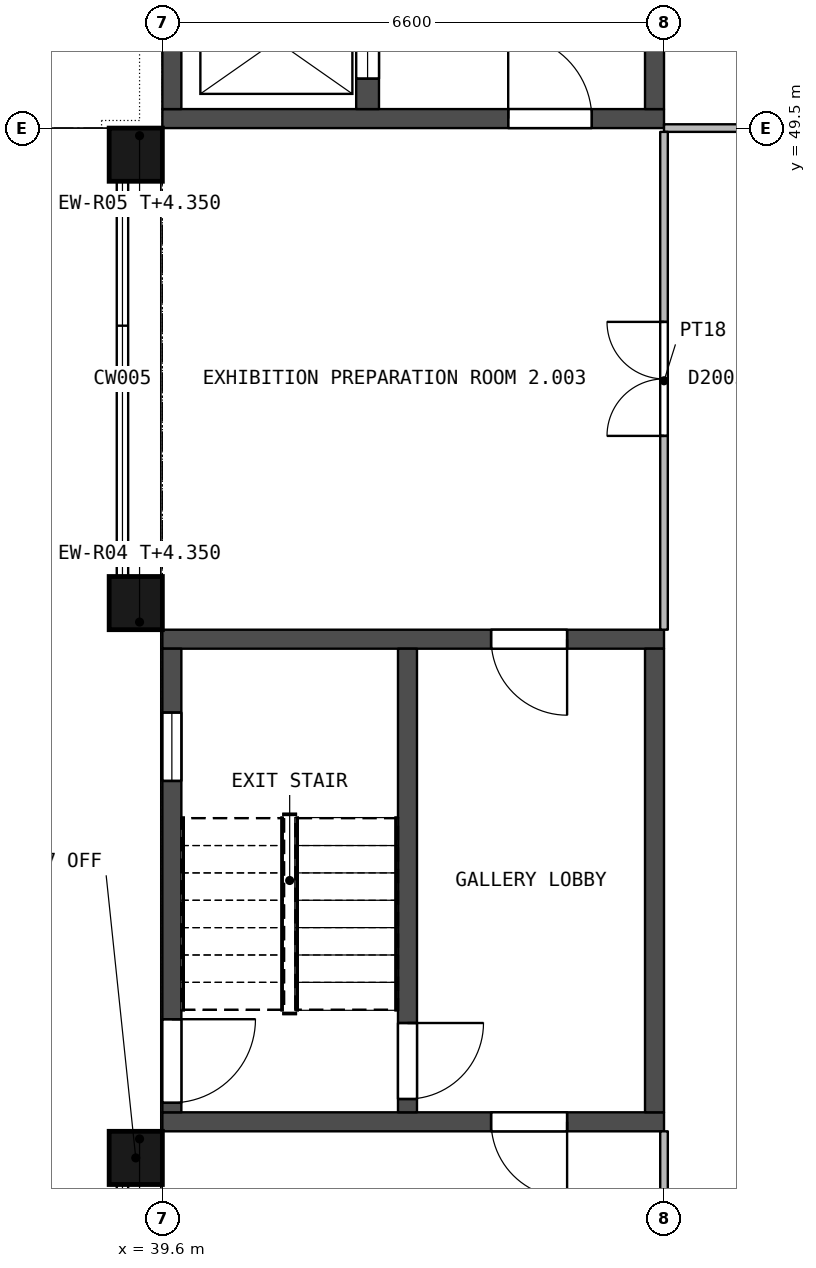
"""IFC4 building model, lengths in metres.
Left out: names, types, materials, properties, quantities, classifications, styles, units other than length and angle.
Written with IfcOpenShell. Run it as: python <this file> out.ifc"""

import sys

from ifc_helpers import new_model, si_unit, direction, frame, frame_2d, origin, origin_2d, place, context, subcontext, project, spatial, rectangle, extrude, element, fill, save


model = new_model("IFC4")
c1 = context("Model", 3, precision=1e-05, world=origin(), true_north=direction((0.0, 1.0)))
c2 = subcontext(c1, "Body", "Model", "MODEL_VIEW")
j1 = project(units=[si_unit("LENGTHUNIT", "METRE"), si_unit("PLANEANGLEUNIT", "RADIAN")], contexts=[c1])
p1 = place(None, origin())
s1 = spatial("IfcSite", under=j1, at=p1, CompositionType="ELEMENT")
p2 = place(p1, origin())
s2 = spatial("IfcBuilding", under=s1, at=p2, CompositionType="ELEMENT")
p3 = place(p2, origin())
s3 = spatial("IfcBuildingStorey", under=s2, at=p3, CompositionType="ELEMENT", Elevation=0.0)
for number, where, z_axis, x_axis in (
    (1, (39.25, 35.95, 0.0), (0.0, 0.0, 1.0), (1.0, 0.0, 0.0)),
    (2, (39.25, 43.25, 0.0), (0.0, 0.0, 1.0), (1.0, 0.0, 0.0)),
    (3, (39.25, 49.15, 0.0), (0.0, 0.0, 1.0), (1.0, 0.0, 0.0)),
):
    element("IfcColumn", number, at=place(p3, frame(where, z_axis=z_axis, x_axis=x_axis)), inside=s3, PredefinedType="COLUMN", context=c2, shape_type="SweptSolid", body=[
        extrude(rectangle(XDim=0.7, YDim=0.7, at=origin_2d()), origin(), (0.0, 0.0, 1.0), 5.4),
    ])
p4 = place(p3, frame((39.6, 49.625, 0.0), z_axis=(0.0, 0.0, 1.0), x_axis=(1.0, 0.0, 0.0)))
e4 = element("IfcWall", 4, at=p4, inside=s3, PredefinedType="SHEAR", context=c2, shape_type="SweptSolid", body=[
    extrude(rectangle(XDim=6.6, YDim=0.25, at=frame_2d((3.3, 0.0))), origin(), (0.0, 0.0, 1.0), 5.15),
])
p5 = place(p4, frame((4.55, 0.0, 0.0)))
e5 = element("IfcOpeningElement", 5, at=p5, cuts=e4, PredefinedType="OPENING", context=c2, shape_type="SweptSolid", body=[
    extrude(rectangle(XDim=1.1, YDim=2.1, at=frame_2d((0.55, 1.05))), frame((0.0, 0.135, 0.0), z_axis=(0.0, -1.0, 0.0), x_axis=(1.0, 0.0, 0.0)), (0.0, 0.0, 1.0), 0.27),
])
p6 = place(p3, frame((46.075, 49.75, 0.0), z_axis=(0.0, 0.0, 1.0), x_axis=(0.0, 1.0, 0.0)))
e6 = element("IfcWall", 6, at=p6, inside=s3, PredefinedType="SHEAR", context=c2, shape_type="SweptSolid", body=[
    extrude(rectangle(XDim=6.1, YDim=0.25, at=frame_2d((3.05, 0.0))), origin(), (0.0, 0.0, 1.0), 5.15),
])
p7 = place(p3, frame((39.725, 49.75, 0.0), z_axis=(0.0, 0.0, 1.0), x_axis=(0.0, 1.0, 0.0)))
e7 = element("IfcWall", 7, at=p7, inside=s3, PredefinedType="SHEAR", context=c2, shape_type="SweptSolid", body=[
    extrude(rectangle(XDim=6.1, YDim=0.25, at=frame_2d((3.05, 0.0))), origin(), (0.0, 0.0, 1.0), 5.15),
])
p8 = place(p7, frame((4.05, 0.0, 2.05)))
e8 = element("IfcOpeningElement", 8, at=p8, cuts=e7, PredefinedType="OPENING", context=c2, shape_type="SweptSolid", body=[
    extrude(rectangle(XDim=0.9, YDim=1.2, at=frame_2d((0.45, 0.6))), frame((0.0, 0.135, 0.0), z_axis=(0.0, -1.0, 0.0), x_axis=(1.0, 0.0, 0.0)), (0.0, 0.0, 1.0), 0.27),
])
p9 = place(p3, frame((42.3, 49.75, 0.0), z_axis=(0.0, 0.0, 1.0), x_axis=(0.0, 1.0, 0.0)))
e9 = element("IfcWall", 9, at=p9, inside=s3, PredefinedType="SHEAR", context=c2, shape_type="SweptSolid", body=[
    extrude(rectangle(XDim=3.05, YDim=0.3, at=frame_2d((1.525, 0.0))), origin(), (0.0, 0.0, 1.0), 5.15),
])
p10 = place(p9, frame((0.4, 0.0, 0.0)))
e10 = element("IfcOpeningElement", 10, at=p10, cuts=e9, PredefinedType="OPENING", context=c2, shape_type="SweptSolid", body=[
    extrude(rectangle(XDim=1.0, YDim=2.1, at=frame_2d((0.5, 1.05))), frame((0.0, 0.16, 0.0), z_axis=(0.0, -1.0, 0.0), x_axis=(1.0, 0.0, 0.0)), (0.0, 0.0, 1.0), 0.32),
])
p11 = place(p3, frame((39.6, 36.425, 0.0), z_axis=(0.0, 0.0, 1.0), x_axis=(1.0, 0.0, 0.0)))
e11 = element("IfcWall", 11, at=p11, inside=s3, PredefinedType="SHEAR", context=c2, shape_type="SweptSolid", body=[
    extrude(rectangle(XDim=6.6, YDim=0.25, at=frame_2d((3.3, 0.0))), origin(), (0.0, 0.0, 1.0), 5.15),
])
p12 = place(p11, frame((4.325, 0.0, 0.0)))
e12 = element("IfcOpeningElement", 12, at=p12, cuts=e11, PredefinedType="OPENING", context=c2, shape_type="SweptSolid", body=[
    extrude(rectangle(XDim=1.0, YDim=2.1, at=frame_2d((0.5, 1.05))), frame((0.0, 0.135, 0.0), z_axis=(0.0, -1.0, 0.0), x_axis=(1.0, 0.0, 0.0)), (0.0, 0.0, 1.0), 0.27),
])
p13 = place(p3, frame((39.6, 42.775, 0.0), z_axis=(0.0, 0.0, 1.0), x_axis=(1.0, 0.0, 0.0)))
e13 = element("IfcWall", 13, at=p13, inside=s3, PredefinedType="SHEAR", context=c2, shape_type="SweptSolid", body=[
    extrude(rectangle(XDim=6.6, YDim=0.25, at=frame_2d((3.3, 0.0))), origin(), (0.0, 0.0, 1.0), 5.15),
])
p14 = place(p13, frame((4.325, 0.0, 0.0)))
e14 = element("IfcOpeningElement", 14, at=p14, cuts=e13, PredefinedType="OPENING", context=c2, shape_type="SweptSolid", body=[
    extrude(rectangle(XDim=1.0, YDim=2.1, at=frame_2d((0.5, 1.05))), frame((0.0, 0.135, 0.0), z_axis=(0.0, -1.0, 0.0), x_axis=(1.0, 0.0, 0.0)), (0.0, 0.0, 1.0), 0.27),
])
p15 = place(p3, frame((39.725, 36.55, 0.0), z_axis=(0.0, 0.0, 1.0), x_axis=(0.0, 1.0, 0.0)))
e15 = element("IfcWall", 15, at=p15, inside=s3, PredefinedType="SHEAR", context=c2, shape_type="SweptSolid", body=[
    extrude(rectangle(XDim=6.1, YDim=0.25, at=frame_2d((3.05, 0.0))), origin(), (0.0, 0.0, 1.0), 5.15),
])
p16 = place(p15, frame((0.125, 0.0, 0.0)))
e16 = element("IfcOpeningElement", 16, at=p16, cuts=e15, PredefinedType="OPENING", context=c2, shape_type="SweptSolid", body=[
    extrude(rectangle(XDim=1.1, YDim=2.4, at=frame_2d((0.55, 1.2))), frame((0.0, 0.135, 0.0), z_axis=(0.0, -1.0, 0.0), x_axis=(1.0, 0.0, 0.0)), (0.0, 0.0, 1.0), 0.27),
])
p17 = place(p15, frame((4.36, 0.0, 2.05)))
e17 = element("IfcOpeningElement", 17, at=p17, cuts=e15, PredefinedType="OPENING", context=c2, shape_type="SweptSolid", body=[
    extrude(rectangle(XDim=0.9, YDim=1.2, at=frame_2d((0.45, 0.6))), frame((0.0, 0.135, 0.0), z_axis=(0.0, -1.0, 0.0), x_axis=(1.0, 0.0, 0.0)), (0.0, 0.0, 1.0), 0.27),
])
p18 = place(p3, frame((46.075, 36.55, 0.0), z_axis=(0.0, 0.0, 1.0), x_axis=(0.0, 1.0, 0.0)))
e18 = element("IfcWall", 18, at=p18, inside=s3, PredefinedType="SHEAR", context=c2, shape_type="SweptSolid", body=[
    extrude(rectangle(XDim=6.1, YDim=0.25, at=frame_2d((3.05, 0.0))), origin(), (0.0, 0.0, 1.0), 5.15),
])
p19 = place(p3, frame((42.825, 36.55, 0.0), z_axis=(0.0, 0.0, 1.0), x_axis=(0.0, 1.0, 0.0)))
e19 = element("IfcWall", 19, at=p19, inside=s3, PredefinedType="SHEAR", context=c2, shape_type="SweptSolid", body=[
    extrude(rectangle(XDim=6.1, YDim=0.25, at=frame_2d((3.05, 0.0))), origin(), (0.0, 0.0, 1.0), 5.15),
])
p20 = place(p19, frame((0.175, 0.0, 0.0)))
e20 = element("IfcOpeningElement", 20, at=p20, cuts=e19, PredefinedType="OPENING", context=c2, shape_type="SweptSolid", body=[
    extrude(rectangle(XDim=1.0, YDim=2.1, at=frame_2d((0.5, 1.05))), frame((0.0, 0.135, 0.0), z_axis=(0.0, -1.0, 0.0), x_axis=(1.0, 0.0, 0.0)), (0.0, 0.0, 1.0), 0.27),
])
for number, where, z_axis, x_axis in (
    (21, (39.6, 36.2, 0.0), (0.0, 0.0, 1.0), (-1.0, 0.0, 0.0)),
    (22, (39.6, 43.0, 0.0), (0.0, 0.0, 1.0), (-1.0, 0.0, 0.0)),
    (23, (39.6, 49.4, 0.0), (0.0, 0.0, 1.0), (-1.0, 0.0, 0.0)),
):
    element("IfcWall", number, at=place(p3, frame(where, z_axis=z_axis, x_axis=x_axis)), inside=s3, PredefinedType="STANDARD", context=c2, shape_type="SweptSolid", body=[
        extrude(rectangle(XDim=0.6, YDim=0.2, at=frame_2d((0.3, 0.0))), origin(), (0.0, 0.0, 1.0), 4.35),
    ])
for number, where, z_axis, x_axis in (
    (24, (46.2, 49.5, 0.0), (0.0, 0.0, 1.0), (1.0, 0.0, 0.0)),
    (25, (46.2, 30.1, 0.0), (0.0, 0.0, 1.0), (0.0, 1.0, 0.0)),
):
    element("IfcWall", number, at=place(p3, frame(where, z_axis=z_axis, x_axis=x_axis)), inside=s3, PredefinedType="PARTITIONING", context=c2, shape_type="SweptSolid", body=[
        extrude(rectangle(XDim=6.2, YDim=0.1, at=frame_2d((3.1, 0.0))), origin(), (0.0, 0.0, 1.0), 4.35),
    ])
p21 = place(p3, frame((46.2, 42.9, 0.0), z_axis=(0.0, 0.0, 1.0), x_axis=(0.0, 1.0, 0.0)))
e26 = element("IfcWall", 26, at=p21, inside=s3, PredefinedType="PARTITIONING", context=c2, shape_type="SweptSolid", body=[
    extrude(rectangle(XDim=6.55, YDim=0.1, at=frame_2d((3.275, 0.0))), origin(), (0.0, 0.0, 1.0), 4.35),
])
p22 = place(p21, frame((2.55, 0.0, 0.0)))
e27 = element("IfcOpeningElement", 27, at=p22, cuts=e26, PredefinedType="OPENING", context=c2, shape_type="SweptSolid", body=[
    extrude(rectangle(XDim=1.5, YDim=2.4, at=frame_2d((0.75, 1.2))), frame((0.0, 0.06, 0.0), z_axis=(0.0, -1.0, 0.0), x_axis=(1.0, 0.0, 0.0)), (0.0, 0.0, 1.0), 0.12),
])
p23 = place(p5, origin())
e28 = element("IfcDoor", 28, at=p23, inside=s3, OperationType="SINGLE_SWING_LEFT", PredefinedType="DOOR", context=c2, shape_type="SweptSolid", body=[
    extrude(rectangle(XDim=1.1, YDim=2.1, at=frame_2d((0.55, 1.05))), frame((0.0, 0.025, 0.0), z_axis=(0.0, -1.0, 0.0), x_axis=(1.0, 0.0, 0.0)), (0.0, 0.0, 1.0), 0.05),
])
fill(e5, e28)
p24 = place(p10, origin())
e29 = element("IfcDoor", 29, at=p24, inside=s3, OperationType="DOUBLE_DOOR_SLIDING", PredefinedType="NOTDEFINED", context=c2, shape_type="SweptSolid", body=[
    extrude(rectangle(XDim=1.0, YDim=2.1, at=frame_2d((0.5, 1.05))), frame((0.0, 0.025, 0.0), z_axis=(0.0, -1.0, 0.0), x_axis=(1.0, 0.0, 0.0)), (0.0, 0.0, 1.0), 0.05),
])
fill(e10, e29)
p25 = place(p12, origin())
e30 = element("IfcDoor", 30, at=p25, inside=s3, OperationType="SINGLE_SWING_RIGHT", PredefinedType="DOOR", context=c2, shape_type="SweptSolid", body=[
    extrude(rectangle(XDim=1.0, YDim=2.1, at=frame_2d((0.5, 1.05))), frame((0.0, 0.025, 0.0), z_axis=(0.0, -1.0, 0.0), x_axis=(1.0, 0.0, 0.0)), (0.0, 0.0, 1.0), 0.05),
])
fill(e12, e30)
p26 = place(p14, origin())
e31 = element("IfcDoor", 31, at=p26, inside=s3, OperationType="SINGLE_SWING_RIGHT", PredefinedType="DOOR", context=c2, shape_type="SweptSolid", body=[
    extrude(rectangle(XDim=1.0, YDim=2.1, at=frame_2d((0.5, 1.05))), frame((0.0, 0.025, 0.0), z_axis=(0.0, -1.0, 0.0), x_axis=(1.0, 0.0, 0.0)), (0.0, 0.0, 1.0), 0.05),
])
fill(e14, e31)
p27 = place(p20, origin())
e32 = element("IfcDoor", 32, at=p27, inside=s3, OperationType="SINGLE_SWING_RIGHT", PredefinedType="DOOR", context=c2, shape_type="SweptSolid", body=[
    extrude(rectangle(XDim=1.0, YDim=2.1, at=frame_2d((0.5, 1.05))), frame((0.0, 0.025, 0.0), z_axis=(0.0, -1.0, 0.0), x_axis=(1.0, 0.0, 0.0)), (0.0, 0.0, 1.0), 0.05),
])
fill(e20, e32)
p28 = place(p16, origin())
e33 = element("IfcDoor", 33, at=p28, inside=s3, OperationType="SINGLE_SWING_RIGHT", PredefinedType="DOOR", context=c2, shape_type="SweptSolid", body=[
    extrude(rectangle(XDim=1.1, YDim=2.4, at=frame_2d((0.55, 1.2))), frame((0.0, 0.025, 0.0), z_axis=(0.0, -1.0, 0.0), x_axis=(1.0, 0.0, 0.0)), (0.0, 0.0, 1.0), 0.05),
])
fill(e16, e33)
p29 = place(p17, origin())
e34 = element("IfcWindow", 34, at=p29, inside=s3, PartitioningType="SINGLE_PANEL", PredefinedType="WINDOW", context=c2, shape_type="SweptSolid", body=[
    extrude(rectangle(XDim=0.9, YDim=1.2, at=frame_2d((0.45, 0.6))), frame((0.0, 0.03, 0.0), z_axis=(0.0, -1.0, 0.0), x_axis=(1.0, 0.0, 0.0)), (0.0, 0.0, 1.0), 0.06),
])
fill(e17, e34)
p30 = place(p22, origin())
e35 = element("IfcDoor", 35, at=p30, inside=s3, OperationType="DOUBLE_DOOR_SINGLE_SWING", PredefinedType="DOOR", context=c2, shape_type="SweptSolid", body=[
    extrude(rectangle(XDim=1.5, YDim=2.4, at=frame_2d((0.75, 1.2))), frame((0.0, 0.025, 0.0), z_axis=(0.0, -1.0, 0.0), x_axis=(1.0, 0.0, 0.0)), (0.0, 0.0, 1.0), 0.05),
])
fill(e27, e35)
save(model, sys.argv[1])
